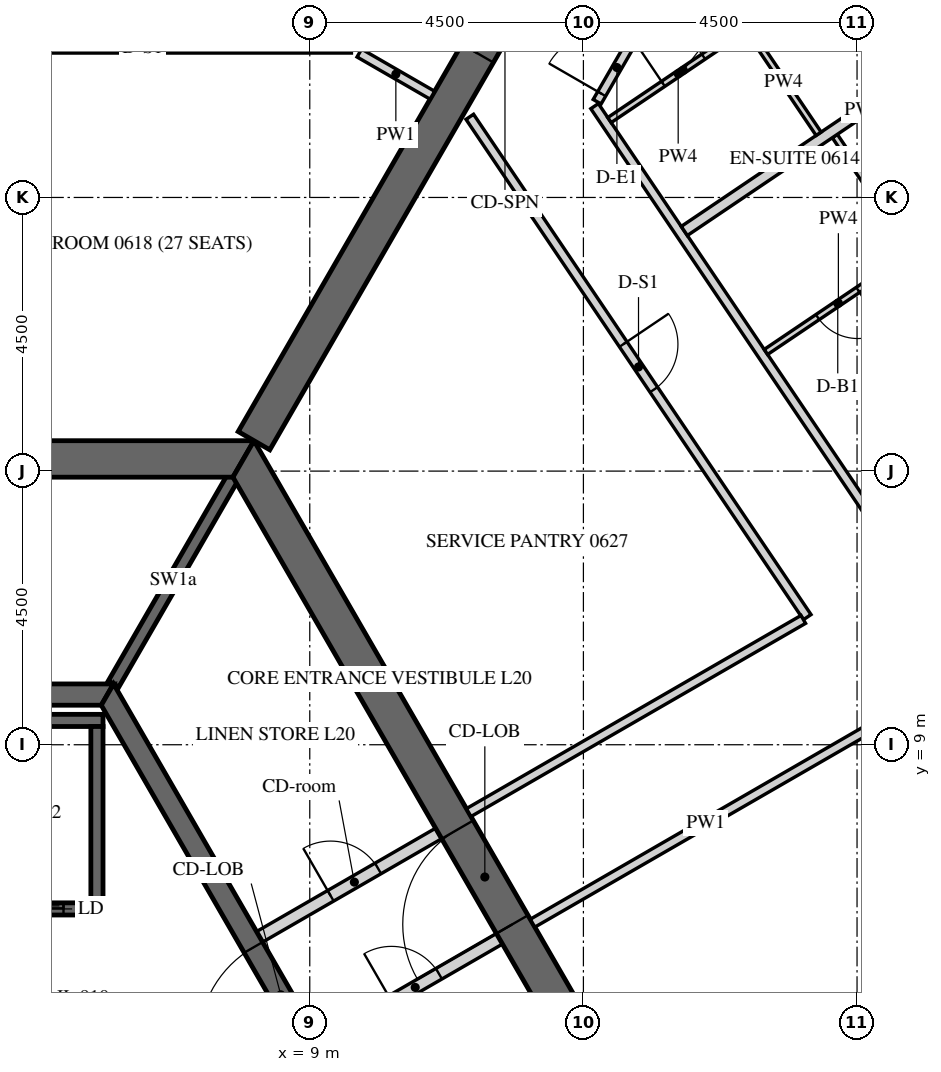
"""IFC4 building model, lengths in metres.
Left out: names, types, materials, properties, quantities, classifications, styles, units other than length and angle.
Written with IfcOpenShell. Run it as: python <this file> out.ifc"""

import sys

from ifc_helpers import new_model, si_unit, direction, frame, frame_2d, origin, place, context, subcontext, project, spatial, polyline, rectangle, outline, extrude, element, fill, save


model = new_model("IFC4")
c1 = context("Model", 3, precision=1e-05, world=origin(), true_north=direction((0.0, 1.0)))
c2 = subcontext(c1, "Body", "Model", "MODEL_VIEW")
j1 = project(units=[si_unit("LENGTHUNIT", "METRE"), si_unit("PLANEANGLEUNIT", "RADIAN")], contexts=[c1])
p1 = place(None, origin())
s1 = spatial("IfcSite", under=j1, at=p1, CompositionType="ELEMENT")
p2 = place(p1, origin())
s2 = spatial("IfcBuilding", under=s1, at=p2, CompositionType="ELEMENT")
p3 = place(p2, frame((0.0, 0.0, 92.1)))
s3 = spatial("IfcBuildingStorey", under=s2, at=p3, CompositionType="ELEMENT", Elevation=92.1)
p4 = place(p3, frame((33.728, 3.153, -0.15), z_axis=(0.0, 0.0, 1.0), x_axis=(-0.559192411416, 0.82903790445, 0.0)))
e1 = element("IfcWall", 1, at=p4, inside=s3, PredefinedType="SOLIDWALL", context=c2, shape_type="SweptSolid", body=[
    extrude(outline(polyline([(-0.026, -0.275), (30.093, -0.275), (30.048, 0.275), (0.026, 0.275), (-0.026, -0.275)])), origin(), (0.0, 0.0, 1.0), 3.9),
])
p5 = place(p4, frame((1.236, 0.0, 1.05)))
e2 = element("IfcOpeningElement", 2, at=p5, cuts=e1, PredefinedType="OPENING", context=c2, shape_type="SweptSolid", body=[
    extrude(rectangle(XDim=2.4, YDim=2.4, at=frame_2d((1.2, 1.2))), frame((0.0, 0.285, 0.0), z_axis=(0.0, -1.0, 0.0), x_axis=(1.0, 0.0, 0.0)), (0.0, 0.0, 1.0), 0.57),
])
p6 = place(p4, frame((4.835, 0.0, 1.05)))
e3 = element("IfcOpeningElement", 3, at=p6, cuts=e1, PredefinedType="OPENING", context=c2, shape_type="SweptSolid", body=[
    extrude(rectangle(XDim=2.4, YDim=2.4, at=frame_2d((1.2, 1.2))), frame((0.0, 0.285, 0.0), z_axis=(0.0, -1.0, 0.0), x_axis=(1.0, 0.0, 0.0)), (0.0, 0.0, 1.0), 0.57),
])
p7 = place(p4, frame((8.436, 0.0, 1.05)))
e4 = element("IfcOpeningElement", 4, at=p7, cuts=e1, PredefinedType="OPENING", context=c2, shape_type="SweptSolid", body=[
    extrude(rectangle(XDim=2.4, YDim=2.4, at=frame_2d((1.2, 1.2))), frame((0.0, 0.285, 0.0), z_axis=(0.0, -1.0, 0.0), x_axis=(1.0, 0.0, 0.0)), (0.0, 0.0, 1.0), 0.57),
])
p8 = place(p4, frame((12.035, 0.0, 1.05)))
e5 = element("IfcOpeningElement", 5, at=p8, cuts=e1, PredefinedType="OPENING", context=c2, shape_type="SweptSolid", body=[
    extrude(rectangle(XDim=2.4, YDim=2.4, at=frame_2d((1.2, 1.2))), frame((0.0, 0.285, 0.0), z_axis=(0.0, -1.0, 0.0), x_axis=(1.0, 0.0, 0.0)), (0.0, 0.0, 1.0), 0.57),
])
p9 = place(p4, frame((15.635, 0.0, 1.05)))
e6 = element("IfcOpeningElement", 6, at=p9, cuts=e1, PredefinedType="OPENING", context=c2, shape_type="SweptSolid", body=[
    extrude(rectangle(XDim=2.4, YDim=2.4, at=frame_2d((1.2, 1.2))), frame((0.0, 0.285, 0.0), z_axis=(0.0, -1.0, 0.0), x_axis=(1.0, 0.0, 0.0)), (0.0, 0.0, 1.0), 0.57),
])
p10 = place(p4, frame((19.236, 0.0, 1.05)))
e7 = element("IfcOpeningElement", 7, at=p10, cuts=e1, PredefinedType="OPENING", context=c2, shape_type="SweptSolid", body=[
    extrude(rectangle(XDim=2.4, YDim=2.4, at=frame_2d((1.2, 1.2))), frame((0.0, 0.285, 0.0), z_axis=(0.0, -1.0, 0.0), x_axis=(1.0, 0.0, 0.0)), (0.0, 0.0, 1.0), 0.57),
])
p11 = place(p4, frame((22.835, 0.0, 1.05)))
e8 = element("IfcOpeningElement", 8, at=p11, cuts=e1, PredefinedType="OPENING", context=c2, shape_type="SweptSolid", body=[
    extrude(rectangle(XDim=2.4, YDim=2.4, at=frame_2d((1.2, 1.2))), frame((0.0, 0.285, 0.0), z_axis=(0.0, -1.0, 0.0), x_axis=(1.0, 0.0, 0.0)), (0.0, 0.0, 1.0), 0.57),
])
p12 = place(p4, frame((26.436, 0.0, 1.05)))
e9 = element("IfcOpeningElement", 9, at=p12, cuts=e1, PredefinedType="OPENING", context=c2, shape_type="SweptSolid", body=[
    extrude(rectangle(XDim=2.4, YDim=2.4, at=frame_2d((1.2, 1.2))), frame((0.0, 0.285, 0.0), z_axis=(0.0, -1.0, 0.0), x_axis=(1.0, 0.0, 0.0)), (0.0, 0.0, 1.0), 0.57),
])
p13 = place(p3, frame((15.819, 0.0, -0.15), z_axis=(0.0, 0.0, 1.0), x_axis=(-0.499999880136, 0.866025472988, 0.0)))
e10 = element("IfcWall", 10, at=p13, inside=s3, PredefinedType="SHEAR", context=c2, shape_type="SweptSolid", body=[
    extrude(outline(polyline([(-0.173, -0.3), (15.993, -0.3), (15.646, 0.3), (0.173, 0.3), (-0.173, -0.3)])), origin(), (0.0, 0.0, 1.0), 3.9),
])
p14 = place(p13, frame((6.981, 0.0, 0.15)))
e11 = element("IfcOpeningElement", 11, at=p14, cuts=e10, PredefinedType="OPENING", context=c2, shape_type="SweptSolid", body=[
    extrude(rectangle(XDim=1.8, YDim=2.4, at=frame_2d((0.9, 1.2))), frame((0.0, 0.31, 0.0), z_axis=(0.0, -1.0, 0.0), x_axis=(1.0, 0.0, 0.0)), (0.0, 0.0, 1.0), 0.62),
])
p15 = place(p3, frame((7.91, 13.7, -0.15), z_axis=(0.0, 0.0, 1.0), x_axis=(-1.0, 0.0, 0.0)))
e12 = element("IfcWall", 12, at=p15, inside=s3, PredefinedType="SHEAR", context=c2, shape_type="SweptSolid", body=[
    extrude(outline(polyline([(-0.173, -0.3), (15.993, -0.3), (15.646, 0.3), (0.173, 0.3), (-0.173, -0.3)])), origin(), (0.0, 0.0, 1.0), 3.9),
])
p16 = place(p15, frame((7.31, 0.0, 0.15)))
e13 = element("IfcOpeningElement", 13, at=p16, cuts=e12, PredefinedType="OPENING", context=c2, shape_type="SweptSolid", body=[
    extrude(rectangle(XDim=1.2, YDim=2.4, at=frame_2d((0.6, 1.2))), frame((0.0, 0.31, 0.0), z_axis=(0.0, -1.0, 0.0), x_axis=(1.0, 0.0, 0.0)), (0.0, 0.0, 1.0), 0.62),
])
p17 = place(p3, frame((8.083, 14.0, -0.15), z_axis=(0.0, 0.0, 1.0), x_axis=(0.499997680643, 0.866026742862, 0.0)))
e14 = element("IfcWall", 14, at=p17, inside=s3, PredefinedType="SHEAR", context=c2, shape_type="SweptSolid", body=[
    extrude(rectangle(XDim=16.509, YDim=0.6, at=frame_2d((8.254, 0.0))), origin(), (0.0, 0.0, 1.0), 3.9),
])
p18 = place(p17, frame((7.354, 0.0, 0.15)))
e15 = element("IfcOpeningElement", 15, at=p18, cuts=e14, PredefinedType="OPENING", context=c2, shape_type="SweptSolid", body=[
    extrude(rectangle(XDim=1.8, YDim=2.4, at=frame_2d((0.9, 1.2))), frame((0.0, 0.31, 0.0), z_axis=(0.0, -1.0, 0.0), x_axis=(1.0, 0.0, 0.0)), (0.0, 0.0, 1.0), 0.62),
])
p19 = place(p3, frame((11.345, 0.0, -0.15), z_axis=(0.0, 0.0, 1.0), x_axis=(-0.499995046907, 0.866028263435, 0.0)))
e16 = element("IfcWall", 16, at=p19, inside=s3, PredefinedType="SHEAR", context=c2, shape_type="SweptSolid", body=[
    extrude(outline(polyline([(-0.101, -0.175), (11.446, -0.175), (11.244, 0.175), (0.101, 0.175), (-0.101, -0.175)])), origin(), (0.0, 0.0, 1.0), 3.9),
])
p20 = place(p19, frame((4.744, 0.0, 0.15)))
e17 = element("IfcOpeningElement", 17, at=p20, cuts=e16, PredefinedType="OPENING", context=c2, shape_type="SweptSolid", body=[
    extrude(rectangle(XDim=1.8, YDim=2.4, at=frame_2d((0.9, 1.2))), frame((0.0, 0.185, 0.0), z_axis=(0.0, -1.0, 0.0), x_axis=(1.0, 0.0, 0.0)), (0.0, 0.0, 1.0), 0.37),
])
p21 = place(p3, frame((5.673, 9.825, -0.15), z_axis=(0.0, 0.0, 1.0), x_axis=(-1.0, 0.0, 0.0)))
e18 = element("IfcWall", 18, at=p21, inside=s3, PredefinedType="SHEAR", context=c2, shape_type="SweptSolid", body=[
    extrude(outline(polyline([(-0.101, -0.175), (11.446, -0.175), (11.244, 0.175), (0.101, 0.175), (-0.101, -0.175)])), origin(), (0.0, 0.0, 1.0), 3.9),
])
p22 = place(p3, frame((-5.6, 6.3, -0.25), z_axis=(0.0, 0.0, 1.0), x_axis=(1.0, 0.0, 0.0)))
e19 = element("IfcWall", 19, at=p22, inside=s3, PredefinedType="SHEAR", context=c2, shape_type="SweptSolid", body=[
    extrude(rectangle(XDim=11.2, YDim=0.2, at=frame_2d((5.6, 0.0))), origin(), (0.0, 0.0, 1.0), 3.9),
])
p23 = place(p22, frame((0.65, 0.0, 0.25)))
e20 = element("IfcOpeningElement", 20, at=p23, cuts=e19, PredefinedType="OPENING", context=c2, shape_type="SweptSolid", body=[
    extrude(rectangle(XDim=1.1, YDim=2.1, at=frame_2d((0.55, 1.05))), frame((0.0, 0.11, 0.0), z_axis=(0.0, -1.0, 0.0), x_axis=(1.0, 0.0, 0.0)), (0.0, 0.0, 1.0), 0.22),
])
p24 = place(p22, frame((2.85, 0.0, 0.25)))
e21 = element("IfcOpeningElement", 21, at=p24, cuts=e19, PredefinedType="OPENING", context=c2, shape_type="SweptSolid", body=[
    extrude(rectangle(XDim=1.1, YDim=2.1, at=frame_2d((0.55, 1.05))), frame((0.0, 0.11, 0.0), z_axis=(0.0, -1.0, 0.0), x_axis=(1.0, 0.0, 0.0)), (0.0, 0.0, 1.0), 0.22),
])
p25 = place(p22, frame((5.05, 0.0, 0.25)))
e22 = element("IfcOpeningElement", 22, at=p25, cuts=e19, PredefinedType="OPENING", context=c2, shape_type="SweptSolid", body=[
    extrude(rectangle(XDim=1.1, YDim=2.1, at=frame_2d((0.55, 1.05))), frame((0.0, 0.11, 0.0), z_axis=(0.0, -1.0, 0.0), x_axis=(1.0, 0.0, 0.0)), (0.0, 0.0, 1.0), 0.22),
])
p26 = place(p22, frame((7.25, 0.0, 0.25)))
e23 = element("IfcOpeningElement", 23, at=p26, cuts=e19, PredefinedType="OPENING", context=c2, shape_type="SweptSolid", body=[
    extrude(rectangle(XDim=1.1, YDim=2.1, at=frame_2d((0.55, 1.05))), frame((0.0, 0.11, 0.0), z_axis=(0.0, -1.0, 0.0), x_axis=(1.0, 0.0, 0.0)), (0.0, 0.0, 1.0), 0.22),
])
p27 = place(p22, frame((9.45, 0.0, 0.25)))
e24 = element("IfcOpeningElement", 24, at=p27, cuts=e19, PredefinedType="OPENING", context=c2, shape_type="SweptSolid", body=[
    extrude(rectangle(XDim=1.1, YDim=2.1, at=frame_2d((0.55, 1.05))), frame((0.0, 0.11, 0.0), z_axis=(0.0, -1.0, 0.0), x_axis=(1.0, 0.0, 0.0)), (0.0, 0.0, 1.0), 0.22),
])
p28 = place(p3, frame((-5.6, 9.4, -0.25), z_axis=(0.0, 0.0, 1.0), x_axis=(1.0, 0.0, 0.0)))
e25 = element("IfcWall", 25, at=p28, inside=s3, PredefinedType="SHEAR", context=c2, shape_type="SweptSolid", body=[
    extrude(rectangle(XDim=11.2, YDim=0.2, at=frame_2d((5.6, 0.0))), origin(), (0.0, 0.0, 1.0), 3.9),
])
p29 = place(p3, frame((5.5, 6.4, -0.25), z_axis=(0.0, 0.0, 1.0), x_axis=(0.0, 1.0, 0.0)))
e26 = element("IfcWall", 26, at=p29, inside=s3, PredefinedType="SHEAR", context=c2, shape_type="SweptSolid", body=[
    extrude(rectangle(XDim=2.9, YDim=0.2, at=frame_2d((1.45, 0.0))), origin(), (0.0, 0.0, 1.0), 3.9),
])
p30 = place(p3, frame((5.773, 10.0, -0.15), z_axis=(0.0, 0.0, 1.0), x_axis=(0.500038251005, 0.86600331843, 0.0)))
e27 = element("IfcWall", 27, at=p30, inside=s3, PredefinedType="SHEAR", context=c2, shape_type="SweptSolid", body=[
    extrude(rectangle(XDim=3.926, YDim=0.2, at=frame_2d((1.963, 0.0))), origin(), (0.0, 0.0, 1.0), 3.9),
])
p31 = place(p3, frame((8.175, 5.841, 0.0), z_axis=(0.0, 0.0, 1.0), x_axis=(0.866020560687, 0.500008388397, 0.0)))
e28 = element("IfcWall", 28, at=p31, inside=s3, PredefinedType="PARTITIONING", context=c2, shape_type="SweptSolid", body=[
    extrude(rectangle(XDim=3.4, YDim=0.2, at=frame_2d((1.7, 0.0))), origin(), (0.0, 0.0, 1.0), 3.65),
])
p32 = place(p31, frame((1.35, 0.0, 0.0)))
e29 = element("IfcOpeningElement", 29, at=p32, cuts=e28, PredefinedType="OPENING", context=c2, shape_type="SweptSolid", body=[
    extrude(rectangle(XDim=0.9, YDim=2.1, at=frame_2d((0.45, 1.05))), frame((0.0, 0.11, 0.0), z_axis=(0.0, -1.0, 0.0), x_axis=(1.0, 0.0, 0.0)), (0.0, 0.0, 1.0), 0.22),
])
p33 = place(p3, frame((9.175, 4.109, 0.0), z_axis=(0.0, 0.0, 1.0), x_axis=(0.865989465428, 0.500062241894, 0.0)))
e30 = element("IfcWall", 30, at=p33, inside=s3, PredefinedType="PARTITIONING", context=c2, shape_type="SweptSolid", body=[
    extrude(rectangle(XDim=3.4, YDim=0.2, at=frame_2d((1.7, 0.0))), origin(), (0.0, 0.0, 1.0), 3.65),
])
p34 = place(p33, frame((1.351, 0.0, 0.0)))
e31 = element("IfcOpeningElement", 31, at=p34, cuts=e30, PredefinedType="OPENING", context=c2, shape_type="SweptSolid", body=[
    extrude(rectangle(XDim=0.9, YDim=2.1, at=frame_2d((0.45, 1.05))), frame((0.0, 0.11, 0.0), z_axis=(0.0, -1.0, 0.0), x_axis=(1.0, 0.0, 0.0)), (0.0, 0.0, 1.0), 0.22),
])
p35 = place(p3, frame((0.825, 20.45, 0.0), z_axis=(0.0, 0.0, 1.0), x_axis=(1.0, 0.0, 0.0)))
e32 = element("IfcWall", 32, at=p35, inside=s3, PredefinedType="PARTITIONING", context=c2, shape_type="SweptSolid", body=[
    extrude(rectangle(XDim=8.86, YDim=0.15, at=frame_2d((4.43, 0.0))), origin(), (0.0, 0.0, 1.0), 2.988),
])
p36 = place(p35, frame((3.98, 0.0, 0.0)))
e33 = element("IfcOpeningElement", 33, at=p36, cuts=e32, PredefinedType="OPENING", context=c2, shape_type="SweptSolid", body=[
    extrude(rectangle(XDim=0.9, YDim=2.1, at=frame_2d((0.45, 1.05))), frame((0.0, 0.085, 0.0), z_axis=(0.0, -1.0, 0.0), x_axis=(1.0, 0.0, 0.0)), (0.0, 0.0, 1.0), 0.17),
])
p37 = place(p3, frame((9.815, 20.375, 0.0), z_axis=(0.0, 0.0, 1.0), x_axis=(0.86600392025, -0.500037208726, 0.0)))
e34 = element("IfcWall", 34, at=p37, inside=s3, PredefinedType="PARTITIONING", context=c2, shape_type="SweptSolid", body=[
    extrude(rectangle(XDim=1.388, YDim=0.15, at=frame_2d((0.694, 0.0))), origin(), (0.0, 0.0, 1.0), 2.988),
])
p38 = place(p3, frame((26.174, 0.985, 0.0), z_axis=(0.0, 0.0, 1.0), x_axis=(-0.559199676409, 0.82903300411, 0.0)))
e35 = element("IfcWall", 35, at=p38, inside=s3, PredefinedType="PARTITIONING", context=c2, shape_type="SweptSolid", body=[
    extrude(rectangle(XDim=22.335, YDim=0.15, at=frame_2d((11.168, 0.0))), origin(), (0.0, 0.0, 1.0), 2.988),
])
p39 = place(p38, frame((0.863, 0.0, 0.0)))
e36 = element("IfcOpeningElement", 36, at=p39, cuts=e35, PredefinedType="OPENING", context=c2, shape_type="SweptSolid", body=[
    extrude(rectangle(XDim=1.0, YDim=2.1, at=frame_2d((0.5, 1.05))), frame((0.0, 0.085, 0.0), z_axis=(0.0, -1.0, 0.0), x_axis=(1.0, 0.0, 0.0)), (0.0, 0.0, 1.0), 0.17),
])
p40 = place(p38, frame((10.909, 0.0, 0.0)))
e37 = element("IfcOpeningElement", 37, at=p40, cuts=e35, PredefinedType="OPENING", context=c2, shape_type="SweptSolid", body=[
    extrude(rectangle(XDim=1.0, YDim=2.1, at=frame_2d((0.5, 1.05))), frame((0.0, 0.085, 0.0), z_axis=(0.0, -1.0, 0.0), x_axis=(1.0, 0.0, 0.0)), (0.0, 0.0, 1.0), 0.17),
])
p41 = place(p3, frame((13.726, 19.574, 0.0), z_axis=(0.0, 0.0, 1.0), x_axis=(0.499951531933, 0.866053385028, 0.0)))
e38 = element("IfcWall", 38, at=p41, inside=s3, PredefinedType="PARTITIONING", context=c2, shape_type="SweptSolid", body=[
    extrude(rectangle(XDim=3.506, YDim=0.15, at=frame_2d((1.753, 0.0))), origin(), (0.0, 0.0, 1.0), 2.988),
])
p42 = place(p41, frame((0.15, 0.0, 0.0)))
e39 = element("IfcOpeningElement", 39, at=p42, cuts=e38, PredefinedType="OPENING", context=c2, shape_type="SweptSolid", body=[
    extrude(rectangle(XDim=1.0, YDim=2.1, at=frame_2d((0.5, 1.05))), frame((0.0, 0.085, 0.0), z_axis=(0.0, -1.0, 0.0), x_axis=(1.0, 0.0, 0.0)), (0.0, 0.0, 1.0), 0.17),
])
p43 = place(p3, frame((12.664, 6.066, 0.0), z_axis=(0.0, 0.0, 1.0), x_axis=(0.866027295802, 0.499996722915, 0.0)))
e40 = element("IfcWall", 40, at=p43, inside=s3, PredefinedType="PARTITIONING", context=c2, shape_type="SweptSolid", body=[
    extrude(rectangle(XDim=6.575, YDim=0.15, at=frame_2d((3.288, 0.0))), origin(), (0.0, 0.0, 1.0), 2.988),
])
p44 = place(p3, frame((11.632, 19.326, 0.0), z_axis=(0.0, 0.0, 1.0), x_axis=(0.559193968377, -0.829036854266, 0.0)))
e41 = element("IfcWall", 41, at=p44, inside=s3, PredefinedType="PARTITIONING", context=c2, shape_type="SweptSolid", body=[
    extrude(rectangle(XDim=9.924, YDim=0.15, at=frame_2d((4.962, 0.0))), origin(), (0.0, 0.0, 1.0), 2.988),
])
p45 = place(p44, frame((4.512, 0.0, 0.0)))
e42 = element("IfcOpeningElement", 42, at=p45, cuts=e41, PredefinedType="OPENING", context=c2, shape_type="SweptSolid", body=[
    extrude(rectangle(XDim=0.9, YDim=2.1, at=frame_2d((0.45, 1.05))), frame((0.0, 0.085, 0.0), z_axis=(0.0, -1.0, 0.0), x_axis=(1.0, 0.0, 0.0)), (0.0, 0.0, 1.0), 0.17),
])
p46 = place(p3, frame((17.116, 11.061, 0.0), z_axis=(0.0, 0.0, 1.0), x_axis=(-0.866021127751, -0.500007406234, 0.0)))
e43 = element("IfcWall", 43, at=p46, inside=s3, PredefinedType="PARTITIONING", context=c2, shape_type="SweptSolid", body=[
    extrude(rectangle(XDim=6.354, YDim=0.15, at=frame_2d((3.177, 0.0))), origin(), (0.0, 0.0, 1.0), 2.988),
])
p47 = place(p3, frame((17.635, 19.01, 0.0), z_axis=(0.0, 0.0, 1.0), x_axis=(0.559204176839, -0.829029968461, 0.0)))
e44 = element("IfcWall", 44, at=p47, inside=s3, PredefinedType="PARTITIONING", context=c2, shape_type="SweptSolid", body=[
    extrude(rectangle(XDim=2.31, YDim=0.1, at=frame_2d((1.155, 0.0))), origin(), (0.0, 0.0, 1.0), 2.988),
])
p48 = place(p3, frame((18.885, 17.067, 0.0), z_axis=(0.0, 0.0, 1.0), x_axis=(-0.829019940088, -0.55921904379, 0.0)))
e45 = element("IfcWall", 45, at=p48, inside=s3, PredefinedType="PARTITIONING", context=c2, shape_type="SweptSolid", body=[
    extrude(rectangle(XDim=2.875, YDim=0.1, at=frame_2d((1.438, 0.0))), origin(), (0.0, 0.0, 1.0), 2.988),
])
p49 = place(p48, frame((1.05, 0.0, 0.0)))
e46 = element("IfcOpeningElement", 46, at=p49, cuts=e45, PredefinedType="OPENING", context=c2, shape_type="SweptSolid", body=[
    extrude(rectangle(XDim=0.8, YDim=2.1, at=frame_2d((0.4, 1.05))), frame((0.0, 0.06, 0.0), z_axis=(0.0, -1.0, 0.0), x_axis=(1.0, 0.0, 0.0)), (0.0, 0.0, 1.0), 0.12),
])
p50 = place(p3, frame((21.066, 21.433, 0.0), z_axis=(0.0, 0.0, 1.0), x_axis=(-0.829022625118, -0.559215063318, 0.0)))
e47 = element("IfcWall", 47, at=p50, inside=s3, PredefinedType="PARTITIONING", context=c2, shape_type="SweptSolid", body=[
    extrude(rectangle(XDim=7.125, YDim=0.18, at=frame_2d((3.562, 0.0))), origin(), (0.0, 0.0, 1.0), 2.988),
])
p51 = place(p3, frame((13.929, 19.273, 0.0), z_axis=(0.0, 0.0, 1.0), x_axis=(0.829047014003, 0.559178905694, 0.0)))
e48 = element("IfcWall", 48, at=p51, inside=s3, PredefinedType="PARTITIONING", context=c2, shape_type="SweptSolid", body=[
    extrude(rectangle(XDim=2.725, YDim=0.1, at=frame_2d((1.362, 0.0))), origin(), (0.0, 0.0, 1.0), 2.988),
])
p52 = place(p51, frame((1.065, 0.0, 0.0)))
e49 = element("IfcOpeningElement", 49, at=p52, cuts=e48, PredefinedType="OPENING", context=c2, shape_type="SweptSolid", body=[
    extrude(rectangle(XDim=0.8, YDim=2.1, at=frame_2d((0.4, 1.05))), frame((0.0, 0.06, 0.0), z_axis=(0.0, -1.0, 0.0), x_axis=(1.0, 0.0, 0.0)), (0.0, 0.0, 1.0), 0.12),
])
p53 = place(p3, frame((16.216, 20.755, 0.0), z_axis=(0.0, 0.0, 1.0), x_axis=(0.559259117518, -0.828992906769, 0.0)))
e50 = element("IfcWall", 50, at=p53, inside=s3, PredefinedType="PARTITIONING", context=c2, shape_type="SweptSolid", body=[
    extrude(rectangle(XDim=2.06, YDim=0.1, at=frame_2d((1.03, 0.0))), origin(), (0.0, 0.0, 1.0), 2.988),
])
p54 = place(p14, origin())
e51 = element("IfcDoor", 51, at=p54, inside=s3, OperationType="DOUBLE_DOOR_SINGLE_SWING", PredefinedType="DOOR", context=c2, shape_type="SweptSolid", body=[
    extrude(rectangle(XDim=1.8, YDim=2.4, at=frame_2d((0.9, 1.2))), frame((0.0, 0.025, 0.0), z_axis=(0.0, -1.0, 0.0), x_axis=(1.0, 0.0, 0.0)), (0.0, 0.0, 1.0), 0.05),
])
fill(e11, e51)
p55 = place(p18, origin())
e52 = element("IfcDoor", 52, at=p55, inside=s3, OperationType="DOUBLE_DOOR_SINGLE_SWING", PredefinedType="DOOR", context=c2, shape_type="SweptSolid", body=[
    extrude(rectangle(XDim=1.8, YDim=2.4, at=frame_2d((0.9, 1.2))), frame((0.0, 0.025, 0.0), z_axis=(0.0, -1.0, 0.0), x_axis=(1.0, 0.0, 0.0)), (0.0, 0.0, 1.0), 0.05),
])
fill(e15, e52)
p56 = place(p20, origin())
e53 = element("IfcDoor", 53, at=p56, inside=s3, OperationType="DOUBLE_DOOR_SINGLE_SWING", PredefinedType="DOOR", context=c2, shape_type="SweptSolid", body=[
    extrude(rectangle(XDim=1.8, YDim=2.4, at=frame_2d((0.9, 1.2))), frame((0.0, 0.025, 0.0), z_axis=(0.0, -1.0, 0.0), x_axis=(1.0, 0.0, 0.0)), (0.0, 0.0, 1.0), 0.05),
])
fill(e17, e53)
p57 = place(p32, origin())
e54 = element("IfcDoor", 54, at=p57, inside=s3, OperationType="SINGLE_SWING_LEFT", PredefinedType="DOOR", context=c2, shape_type="SweptSolid", body=[
    extrude(rectangle(XDim=0.9, YDim=2.1, at=frame_2d((0.45, 1.05))), frame((0.0, 0.025, 0.0), z_axis=(0.0, -1.0, 0.0), x_axis=(1.0, 0.0, 0.0)), (0.0, 0.0, 1.0), 0.05),
])
fill(e29, e54)
p58 = place(p34, origin())
e55 = element("IfcDoor", 55, at=p58, inside=s3, OperationType="SINGLE_SWING_LEFT", PredefinedType="DOOR", context=c2, shape_type="SweptSolid", body=[
    extrude(rectangle(XDim=0.9, YDim=2.1, at=frame_2d((0.45, 1.05))), frame((0.0, 0.025, 0.0), z_axis=(0.0, -1.0, 0.0), x_axis=(1.0, 0.0, 0.0)), (0.0, 0.0, 1.0), 0.05),
])
fill(e31, e55)
p59 = place(p27, origin())
e56 = element("IfcDoor", 56, at=p59, inside=s3, OperationType="SLIDING_TO_LEFT", PredefinedType="DOOR", context=c2, shape_type="SweptSolid", body=[
    extrude(rectangle(XDim=1.1, YDim=2.1, at=frame_2d((0.55, 1.05))), frame((0.0, 0.025, 0.0), z_axis=(0.0, -1.0, 0.0), x_axis=(1.0, 0.0, 0.0)), (0.0, 0.0, 1.0), 0.05),
])
fill(e24, e56)
p60 = place(p49, origin())
e57 = element("IfcDoor", 57, at=p60, inside=s3, OperationType="SINGLE_SWING_LEFT", PredefinedType="DOOR", context=c2, shape_type="SweptSolid", body=[
    extrude(rectangle(XDim=0.8, YDim=2.1, at=frame_2d((0.4, 1.05))), frame((0.0, 0.025, 0.0), z_axis=(0.0, -1.0, 0.0), x_axis=(1.0, 0.0, 0.0)), (0.0, 0.0, 1.0), 0.05),
])
fill(e46, e57)
p61 = place(p42, origin())
e58 = element("IfcDoor", 58, at=p61, inside=s3, OperationType="SINGLE_SWING_LEFT", PredefinedType="DOOR", context=c2, shape_type="SweptSolid", body=[
    extrude(rectangle(XDim=1.0, YDim=2.1, at=frame_2d((0.5, 1.05))), frame((0.0, 0.025, 0.0), z_axis=(0.0, -1.0, 0.0), x_axis=(1.0, 0.0, 0.0)), (0.0, 0.0, 1.0), 0.05),
])
fill(e39, e58)
p62 = place(p52, origin())
e59 = element("IfcDoor", 59, at=p62, inside=s3, OperationType="SINGLE_SWING_LEFT", PredefinedType="DOOR", context=c2, shape_type="SweptSolid", body=[
    extrude(rectangle(XDim=0.8, YDim=2.1, at=frame_2d((0.4, 1.05))), frame((0.0, 0.025, 0.0), z_axis=(0.0, -1.0, 0.0), x_axis=(1.0, 0.0, 0.0)), (0.0, 0.0, 1.0), 0.05),
])
fill(e49, e59)
p63 = place(p45, origin())
e60 = element("IfcDoor", 60, at=p63, inside=s3, OperationType="SINGLE_SWING_LEFT", PredefinedType="DOOR", context=c2, shape_type="SweptSolid", body=[
    extrude(rectangle(XDim=0.9, YDim=2.1, at=frame_2d((0.45, 1.05))), frame((0.0, 0.025, 0.0), z_axis=(0.0, -1.0, 0.0), x_axis=(1.0, 0.0, 0.0)), (0.0, 0.0, 1.0), 0.05),
])
fill(e42, e60)
save(model, sys.argv[1])
